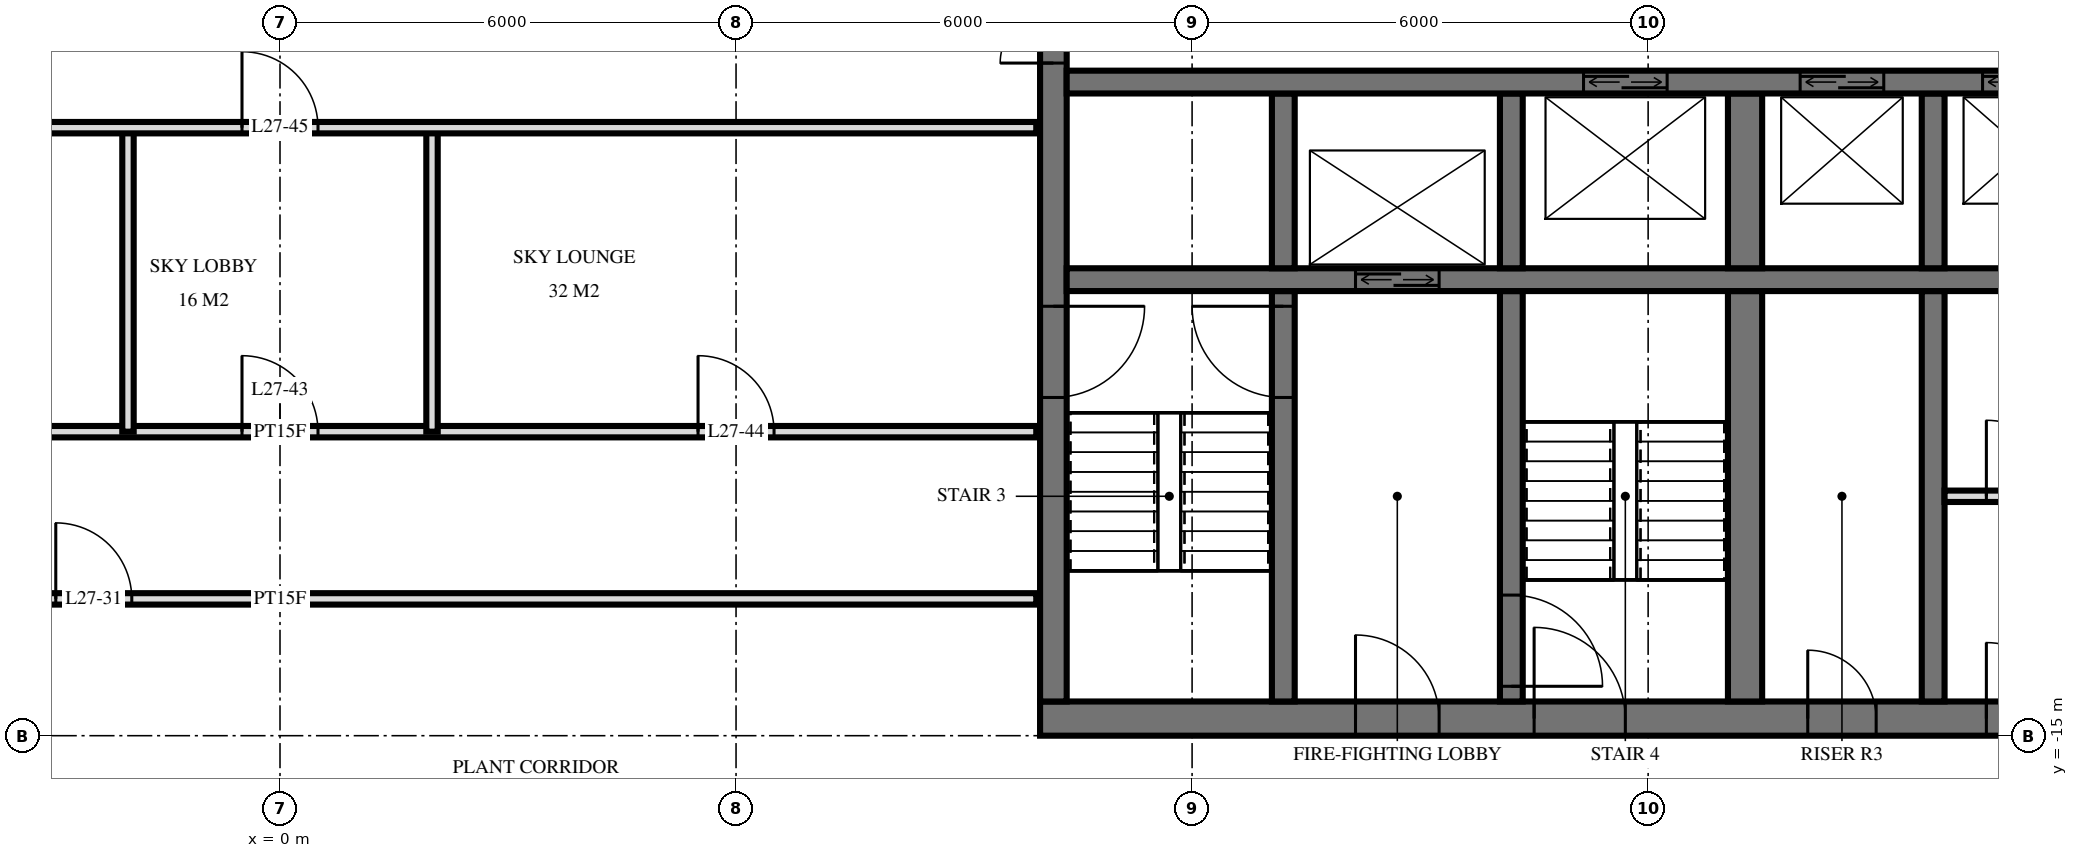
"""IFC4 building model, lengths in metres.
Left out: names, types, materials, properties, quantities, classifications, styles, units other than length and angle.
Written with IfcOpenShell. Run it as: python <this file> out.ifc"""

import sys

from ifc_helpers import new_model, si_unit, direction, frame, frame_2d, origin, place, context, subcontext, project, spatial, rectangle, extrude, element, fill, save


model = new_model("IFC4")
c1 = context("Model", 3, precision=1e-05, world=origin(), true_north=direction((0.0, 1.0)))
c2 = subcontext(c1, "Body", "Model", "MODEL_VIEW")
j1 = project(units=[si_unit("LENGTHUNIT", "METRE"), si_unit("PLANEANGLEUNIT", "RADIAN")], contexts=[c1])
p1 = place(None, origin())
s1 = spatial("IfcSite", under=j1, at=p1, CompositionType="ELEMENT")
p2 = place(p1, origin())
s2 = spatial("IfcBuilding", under=s1, at=p2, CompositionType="ELEMENT")
p3 = place(p2, frame((0.0, 0.0, 106.8)))
s3 = spatial("IfcBuildingStorey", under=s2, at=p3, CompositionType="ELEMENT", Elevation=106.8)
p4 = place(p3, frame((10.0, -14.775, 0.0), z_axis=(0.0, 0.0, 1.0), x_axis=(1.0, 0.0, 0.0)))
e1 = element("IfcWall", 1, at=p4, inside=s3, PredefinedType="SHEAR", context=c2, shape_type="SweptSolid", body=[
    extrude(rectangle(XDim=14.5, YDim=0.45, at=frame_2d((7.25, 0.0))), origin(), (0.0, 0.0, 1.0), 6.0),
])
p5 = place(p4, frame((6.5, 0.0, 0.0)))
e2 = element("IfcOpeningElement", 2, at=p5, cuts=e1, PredefinedType="OPENING", context=c2, shape_type="SweptSolid", body=[
    extrude(rectangle(XDim=1.2, YDim=2.1, at=frame_2d((0.6, 1.05))), frame((0.0, 0.235, 0.0), z_axis=(0.0, -1.0, 0.0), x_axis=(1.0, 0.0, 0.0)), (0.0, 0.0, 1.0), 0.47),
])
p6 = place(p4, frame((4.15, 0.0, 0.0)))
e3 = element("IfcOpeningElement", 3, at=p6, cuts=e1, PredefinedType="OPENING", context=c2, shape_type="SweptSolid", body=[
    extrude(rectangle(XDim=1.1, YDim=2.1, at=frame_2d((0.55, 1.05))), frame((0.0, 0.235, 0.0), z_axis=(0.0, -1.0, 0.0), x_axis=(1.0, 0.0, 0.0)), (0.0, 0.0, 1.0), 0.47),
])
p7 = place(p4, frame((10.1, 0.0, 0.0)))
e4 = element("IfcOpeningElement", 4, at=p7, cuts=e1, PredefinedType="OPENING", context=c2, shape_type="SweptSolid", body=[
    extrude(rectangle(XDim=0.9, YDim=2.1, at=frame_2d((0.45, 1.05))), frame((0.0, 0.235, 0.0), z_axis=(0.0, -1.0, 0.0), x_axis=(1.0, 0.0, 0.0)), (0.0, 0.0, 1.0), 0.47),
])
p8 = place(p4, frame((12.45, 0.0, 0.0)))
e5 = element("IfcOpeningElement", 5, at=p8, cuts=e1, PredefinedType="OPENING", context=c2, shape_type="SweptSolid", body=[
    extrude(rectangle(XDim=1.0, YDim=2.1, at=frame_2d((0.5, 1.05))), frame((0.0, 0.235, 0.0), z_axis=(0.0, -1.0, 0.0), x_axis=(1.0, 0.0, 0.0)), (0.0, 0.0, 1.0), 0.47),
])
p9 = place(p3, frame((10.175, -14.55, 0.0), z_axis=(0.0, 0.0, 1.0), x_axis=(0.0, 1.0, 0.0)))
e6 = element("IfcWall", 6, at=p9, inside=s3, PredefinedType="SHEAR", context=c2, shape_type="SweptSolid", body=[
    extrude(rectangle(XDim=14.1, YDim=0.35, at=frame_2d((7.05, 0.0))), origin(), (0.0, 0.0, 1.0), 6.0),
])
p10 = place(p9, frame((8.4, 0.0, 0.0)))
e7 = element("IfcOpeningElement", 7, at=p10, cuts=e6, PredefinedType="OPENING", context=c2, shape_type="SweptSolid", body=[
    extrude(rectangle(XDim=1.4, YDim=2.4, at=frame_2d((0.7, 1.2))), frame((0.0, 0.185, 0.0), z_axis=(0.0, -1.0, 0.0), x_axis=(1.0, 0.0, 0.0)), (0.0, 0.0, 1.0), 0.37),
])
p11 = place(p9, frame((10.0, 0.0, 0.0)))
e8 = element("IfcOpeningElement", 8, at=p11, cuts=e6, PredefinedType="OPENING", context=c2, shape_type="SweptSolid", body=[
    extrude(rectangle(XDim=1.4, YDim=2.4, at=frame_2d((0.7, 1.2))), frame((0.0, 0.185, 0.0), z_axis=(0.0, -1.0, 0.0), x_axis=(1.0, 0.0, 0.0)), (0.0, 0.0, 1.0), 0.37),
])
p12 = place(p9, frame((4.0, 0.0, 0.0)))
e9 = element("IfcOpeningElement", 9, at=p12, cuts=e6, PredefinedType="OPENING", context=c2, shape_type="SweptSolid", body=[
    extrude(rectangle(XDim=1.2, YDim=2.1, at=frame_2d((0.6, 1.05))), frame((0.0, 0.185, 0.0), z_axis=(0.0, -1.0, 0.0), x_axis=(1.0, 0.0, 0.0)), (0.0, 0.0, 1.0), 0.37),
])
p13 = place(p3, frame((10.35, -6.4, 0.0), z_axis=(0.0, 0.0, 1.0), x_axis=(1.0, 0.0, 0.0)))
e10 = element("IfcWall", 10, at=p13, inside=s3, PredefinedType="SHEAR", context=c2, shape_type="SweptSolid", body=[
    extrude(rectangle(XDim=13.7, YDim=0.3, at=frame_2d((6.85, 0.0))), origin(), (0.0, 0.0, 1.0), 6.0),
])
p14 = place(p13, frame((9.65, 0.0, 0.0)))
e11 = element("IfcOpeningElement", 11, at=p14, cuts=e10, PredefinedType="OPENING", context=c2, shape_type="SweptSolid", body=[
    extrude(rectangle(XDim=1.1, YDim=2.1, at=frame_2d((0.55, 1.05))), frame((0.0, 0.16, 0.0), z_axis=(0.0, -1.0, 0.0), x_axis=(1.0, 0.0, 0.0)), (0.0, 0.0, 1.0), 0.32),
])
p15 = place(p13, frame((12.05, 0.0, 0.0)))
e12 = element("IfcOpeningElement", 12, at=p15, cuts=e10, PredefinedType="OPENING", context=c2, shape_type="SweptSolid", body=[
    extrude(rectangle(XDim=1.1, YDim=2.1, at=frame_2d((0.55, 1.05))), frame((0.0, 0.16, 0.0), z_axis=(0.0, -1.0, 0.0), x_axis=(1.0, 0.0, 0.0)), (0.0, 0.0, 1.0), 0.32),
])
p16 = place(p13, frame((6.8, 0.0, 0.0)))
e13 = element("IfcOpeningElement", 13, at=p16, cuts=e10, PredefinedType="OPENING", context=c2, shape_type="SweptSolid", body=[
    extrude(rectangle(XDim=1.1, YDim=2.1, at=frame_2d((0.55, 1.05))), frame((0.0, 0.16, 0.0), z_axis=(0.0, -1.0, 0.0), x_axis=(1.0, 0.0, 0.0)), (0.0, 0.0, 1.0), 0.32),
])
p17 = place(p3, frame((10.35, -9.0, 0.0), z_axis=(0.0, 0.0, 1.0), x_axis=(1.0, 0.0, 0.0)))
e14 = element("IfcWall", 14, at=p17, inside=s3, PredefinedType="SHEAR", context=c2, shape_type="SweptSolid", body=[
    extrude(rectangle(XDim=13.7, YDim=0.3, at=frame_2d((6.85, 0.0))), origin(), (0.0, 0.0, 1.0), 6.0),
])
p18 = place(p17, frame((3.8, 0.0, 0.0)))
e15 = element("IfcOpeningElement", 15, at=p18, cuts=e14, PredefinedType="OPENING", context=c2, shape_type="SweptSolid", body=[
    extrude(rectangle(XDim=1.1, YDim=2.1, at=frame_2d((0.55, 1.05))), frame((0.0, 0.16, 0.0), z_axis=(0.0, -1.0, 0.0), x_axis=(1.0, 0.0, 0.0)), (0.0, 0.0, 1.0), 0.32),
])
p19 = place(p3, frame((13.2, -8.85, 0.0), z_axis=(0.0, 0.0, 1.0), x_axis=(0.0, 1.0, 0.0)))
e16 = element("IfcWall", 16, at=p19, inside=s3, PredefinedType="SHEAR", context=c2, shape_type="SweptSolid", body=[
    extrude(rectangle(XDim=2.3, YDim=0.3, at=frame_2d((1.15, 0.0))), origin(), (0.0, 0.0, 1.0), 6.0),
])
p20 = place(p3, frame((13.2, -14.55, 0.0), z_axis=(0.0, 0.0, 1.0), x_axis=(0.0, 1.0, 0.0)))
e17 = element("IfcWall", 17, at=p20, inside=s3, PredefinedType="SHEAR", context=c2, shape_type="SweptSolid", body=[
    extrude(rectangle(XDim=5.4, YDim=0.3, at=frame_2d((2.7, 0.0))), origin(), (0.0, 0.0, 1.0), 6.0),
])
p21 = place(p20, frame((4.0, 0.0, 0.0)))
e18 = element("IfcOpeningElement", 18, at=p21, cuts=e17, PredefinedType="OPENING", context=c2, shape_type="SweptSolid", body=[
    extrude(rectangle(XDim=1.2, YDim=2.1, at=frame_2d((0.6, 1.05))), frame((0.0, 0.16, 0.0), z_axis=(0.0, -1.0, 0.0), x_axis=(1.0, 0.0, 0.0)), (0.0, 0.0, 1.0), 0.32),
])
p22 = place(p3, frame((16.2, -8.85, 0.0), z_axis=(0.0, 0.0, 1.0), x_axis=(0.0, 1.0, 0.0)))
e19 = element("IfcWall", 19, at=p22, inside=s3, PredefinedType="SHEAR", context=c2, shape_type="SweptSolid", body=[
    extrude(rectangle(XDim=2.3, YDim=0.3, at=frame_2d((1.15, 0.0))), origin(), (0.0, 0.0, 1.0), 6.0),
])
p23 = place(p3, frame((16.2, -14.55, 0.0), z_axis=(0.0, 0.0, 1.0), x_axis=(0.0, 1.0, 0.0)))
e20 = element("IfcWall", 20, at=p23, inside=s3, PredefinedType="SHEAR", context=c2, shape_type="SweptSolid", body=[
    extrude(rectangle(XDim=5.4, YDim=0.3, at=frame_2d((2.7, 0.0))), origin(), (0.0, 0.0, 1.0), 6.0),
])
p24 = place(p23, frame((0.2, 0.0, 0.0)))
e21 = element("IfcOpeningElement", 21, at=p24, cuts=e20, PredefinedType="OPENING", context=c2, shape_type="SweptSolid", body=[
    extrude(rectangle(XDim=1.2, YDim=2.1, at=frame_2d((0.6, 1.05))), frame((0.0, 0.16, 0.0), z_axis=(0.0, -1.0, 0.0), x_axis=(1.0, 0.0, 0.0)), (0.0, 0.0, 1.0), 0.32),
])
p25 = place(p3, frame((19.275, -8.85, 0.0), z_axis=(0.0, 0.0, 1.0), x_axis=(0.0, 1.0, 0.0)))
e22 = element("IfcWall", 22, at=p25, inside=s3, PredefinedType="SHEAR", context=c2, shape_type="SweptSolid", body=[
    extrude(rectangle(XDim=2.3, YDim=0.45, at=frame_2d((1.15, 0.0))), origin(), (0.0, 0.0, 1.0), 6.0),
])
p26 = place(p3, frame((19.275, -14.55, 0.0), z_axis=(0.0, 0.0, 1.0), x_axis=(0.0, 1.0, 0.0)))
e23 = element("IfcWall", 23, at=p26, inside=s3, PredefinedType="SHEAR", context=c2, shape_type="SweptSolid", body=[
    extrude(rectangle(XDim=5.4, YDim=0.45, at=frame_2d((2.7, 0.0))), origin(), (0.0, 0.0, 1.0), 6.0),
])
p27 = place(p3, frame((21.75, -8.85, 0.0), z_axis=(0.0, 0.0, 1.0), x_axis=(0.0, 1.0, 0.0)))
e24 = element("IfcWall", 24, at=p27, inside=s3, PredefinedType="SHEAR", context=c2, shape_type="SweptSolid", body=[
    extrude(rectangle(XDim=2.3, YDim=0.3, at=frame_2d((1.15, 0.0))), origin(), (0.0, 0.0, 1.0), 6.0),
])
p28 = place(p3, frame((21.75, -14.55, 0.0), z_axis=(0.0, 0.0, 1.0), x_axis=(0.0, 1.0, 0.0)))
e25 = element("IfcWall", 25, at=p28, inside=s3, PredefinedType="SHEAR", context=c2, shape_type="SweptSolid", body=[
    extrude(rectangle(XDim=5.4, YDim=0.3, at=frame_2d((2.7, 0.0))), origin(), (0.0, 0.0, 1.0), 6.0),
])
p29 = place(p3, frame((21.9, -11.85, 0.0), z_axis=(0.0, 0.0, 1.0), x_axis=(1.0, 0.0, 0.0)))
e26 = element("IfcWall", 26, at=p29, inside=s3, PredefinedType="PARTITIONING", context=c2, shape_type="SweptSolid", body=[
    extrude(rectangle(XDim=2.1, YDim=0.15, at=frame_2d((1.05, 0.0))), origin(), (0.0, 0.0, 1.0), 5.7),
])
p30 = place(p29, frame((0.55, 0.0, 0.0)))
e27 = element("IfcOpeningElement", 27, at=p30, cuts=e26, PredefinedType="OPENING", context=c2, shape_type="SweptSolid", body=[
    extrude(rectangle(XDim=1.0, YDim=2.1, at=frame_2d((0.5, 1.05))), frame((0.0, 0.085, 0.0), z_axis=(0.0, -1.0, 0.0), x_axis=(1.0, 0.0, 0.0)), (0.0, 0.0, 1.0), 0.17),
])
for number, where, z_axis, x_axis in (
    (28, (2.0, -11.0, 0.0), (0.0, 0.0, 1.0), (0.0, 1.0, 0.0)),
    (29, (-2.0, -11.0, 0.0), (0.0, 0.0, 1.0), (0.0, 1.0, 0.0)),
):
    element("IfcWall", number, at=place(p3, frame(where, z_axis=z_axis, x_axis=x_axis)), inside=s3, PredefinedType="PARTITIONING", context=c2, shape_type="SweptSolid", body=[
        extrude(rectangle(XDim=4.0, YDim=0.15, at=frame_2d((2.0, 0.0))), origin(), (0.0, 0.0, 1.0), 5.7),
    ])
p31 = place(p3, frame((-9.95, -13.2, 0.0), z_axis=(0.0, 0.0, 1.0), x_axis=(1.0, 0.0, 0.0)))
e30 = element("IfcWall", 30, at=p31, inside=s3, PredefinedType="PARTITIONING", context=c2, shape_type="SweptSolid", body=[
    extrude(rectangle(XDim=19.9, YDim=0.15, at=frame_2d((9.95, 0.0))), origin(), (0.0, 0.0, 1.0), 5.7),
])
p32 = place(p31, frame((7.0, 0.0, 0.0)))
e31 = element("IfcOpeningElement", 31, at=p32, cuts=e30, PredefinedType="OPENING", context=c2, shape_type="SweptSolid", body=[
    extrude(rectangle(XDim=1.0, YDim=2.1, at=frame_2d((0.5, 1.05))), frame((0.0, 0.085, 0.0), z_axis=(0.0, -1.0, 0.0), x_axis=(1.0, 0.0, 0.0)), (0.0, 0.0, 1.0), 0.17),
])
p33 = place(p3, frame((-9.95, -11.0, 0.0), z_axis=(0.0, 0.0, 1.0), x_axis=(1.0, 0.0, 0.0)))
e32 = element("IfcWall", 32, at=p33, inside=s3, PredefinedType="PARTITIONING", context=c2, shape_type="SweptSolid", body=[
    extrude(rectangle(XDim=19.9, YDim=0.15, at=frame_2d((9.95, 0.0))), origin(), (0.0, 0.0, 1.0), 5.7),
])
p34 = place(p33, frame((9.45, 0.0, 0.0)))
e33 = element("IfcOpeningElement", 33, at=p34, cuts=e32, PredefinedType="OPENING", context=c2, shape_type="SweptSolid", body=[
    extrude(rectangle(XDim=1.0, YDim=2.1, at=frame_2d((0.5, 1.05))), frame((0.0, 0.085, 0.0), z_axis=(0.0, -1.0, 0.0), x_axis=(1.0, 0.0, 0.0)), (0.0, 0.0, 1.0), 0.17),
])
p35 = place(p33, frame((15.45, 0.0, 0.0)))
e34 = element("IfcOpeningElement", 34, at=p35, cuts=e32, PredefinedType="OPENING", context=c2, shape_type="SweptSolid", body=[
    extrude(rectangle(XDim=1.0, YDim=2.1, at=frame_2d((0.5, 1.05))), frame((0.0, 0.085, 0.0), z_axis=(0.0, -1.0, 0.0), x_axis=(1.0, 0.0, 0.0)), (0.0, 0.0, 1.0), 0.17),
])
p36 = place(p3, frame((-9.95, -7.0, 0.0), z_axis=(0.0, 0.0, 1.0), x_axis=(1.0, 0.0, 0.0)))
e35 = element("IfcWall", 35, at=p36, inside=s3, PredefinedType="PARTITIONING", context=c2, shape_type="SweptSolid", body=[
    extrude(rectangle(XDim=19.9, YDim=0.15, at=frame_2d((9.95, 0.0))), origin(), (0.0, 0.0, 1.0), 5.7),
])
p37 = place(p36, frame((9.45, 0.0, 0.0)))
e36 = element("IfcOpeningElement", 36, at=p37, cuts=e35, PredefinedType="OPENING", context=c2, shape_type="SweptSolid", body=[
    extrude(rectangle(XDim=1.0, YDim=2.1, at=frame_2d((0.5, 1.05))), frame((0.0, 0.085, 0.0), z_axis=(0.0, -1.0, 0.0), x_axis=(1.0, 0.0, 0.0)), (0.0, 0.0, 1.0), 0.17),
])
p38 = place(p36, frame((2.0, 0.0, 0.0)))
e37 = element("IfcOpeningElement", 37, at=p38, cuts=e35, PredefinedType="OPENING", context=c2, shape_type="SweptSolid", body=[
    extrude(rectangle(XDim=1.0, YDim=2.1, at=frame_2d((0.5, 1.05))), frame((0.0, 0.085, 0.0), z_axis=(0.0, -1.0, 0.0), x_axis=(1.0, 0.0, 0.0)), (0.0, 0.0, 1.0), 0.17),
])
p39 = place(p14, origin())
e38 = element("IfcDoor", 38, at=p39, inside=s3, OperationType="DOUBLE_DOOR_SLIDING", PredefinedType="USERDEFINED", context=c2, shape_type="SweptSolid", body=[
    extrude(rectangle(XDim=1.1, YDim=2.1, at=frame_2d((0.55, 1.05))), frame((0.0, 0.025, 0.0), z_axis=(0.0, -1.0, 0.0), x_axis=(1.0, 0.0, 0.0)), (0.0, 0.0, 1.0), 0.05),
])
fill(e11, e38)
p40 = place(p15, origin())
e39 = element("IfcDoor", 39, at=p40, inside=s3, OperationType="DOUBLE_DOOR_SLIDING", PredefinedType="USERDEFINED", context=c2, shape_type="SweptSolid", body=[
    extrude(rectangle(XDim=1.1, YDim=2.1, at=frame_2d((0.55, 1.05))), frame((0.0, 0.025, 0.0), z_axis=(0.0, -1.0, 0.0), x_axis=(1.0, 0.0, 0.0)), (0.0, 0.0, 1.0), 0.05),
])
fill(e12, e39)
p41 = place(p18, origin())
e40 = element("IfcDoor", 40, at=p41, inside=s3, OperationType="DOUBLE_DOOR_SLIDING", PredefinedType="USERDEFINED", context=c2, shape_type="SweptSolid", body=[
    extrude(rectangle(XDim=1.1, YDim=2.1, at=frame_2d((0.55, 1.05))), frame((0.0, 0.025, 0.0), z_axis=(0.0, -1.0, 0.0), x_axis=(1.0, 0.0, 0.0)), (0.0, 0.0, 1.0), 0.05),
])
fill(e15, e40)
p42 = place(p16, origin())
e41 = element("IfcDoor", 41, at=p42, inside=s3, OperationType="DOUBLE_DOOR_SLIDING", PredefinedType="USERDEFINED", context=c2, shape_type="SweptSolid", body=[
    extrude(rectangle(XDim=1.1, YDim=2.1, at=frame_2d((0.55, 1.05))), frame((0.0, 0.025, 0.0), z_axis=(0.0, -1.0, 0.0), x_axis=(1.0, 0.0, 0.0)), (0.0, 0.0, 1.0), 0.05),
])
fill(e13, e41)
p43 = place(p10, origin())
e42 = element("IfcDoor", 42, at=p43, inside=s3, OperationType="DOUBLE_DOOR_SINGLE_SWING", PredefinedType="DOOR", context=c2, shape_type="SweptSolid", body=[
    extrude(rectangle(XDim=1.4, YDim=2.4, at=frame_2d((0.7, 1.2))), frame((0.0, 0.025, 0.0), z_axis=(0.0, -1.0, 0.0), x_axis=(1.0, 0.0, 0.0)), (0.0, 0.0, 1.0), 0.05),
])
fill(e7, e42)
p44 = place(p12, frame((0.6, 0.0, 0.0), z_axis=(0.0, 0.0, 1.0), x_axis=(-1.0, 0.0, 0.0)))
e43 = element("IfcDoor", 43, at=p44, inside=s3, OperationType="SINGLE_SWING_RIGHT", PredefinedType="DOOR", context=c2, shape_type="SweptSolid", body=[
    extrude(rectangle(XDim=1.2, YDim=2.1, at=frame_2d((0.0, 1.05))), frame((0.0, -0.025, 0.0), z_axis=(0.0, 1.0, 0.0), x_axis=(-1.0, 0.0, 0.0)), (0.0, 0.0, 1.0), 0.05),
])
fill(e9, e43)
p45 = place(p5, origin())
e44 = element("IfcDoor", 44, at=p45, inside=s3, OperationType="SINGLE_SWING_RIGHT", PredefinedType="DOOR", context=c2, shape_type="SweptSolid", body=[
    extrude(rectangle(XDim=1.2, YDim=2.1, at=frame_2d((0.6, 1.05))), frame((0.0, 0.025, 0.0), z_axis=(0.0, -1.0, 0.0), x_axis=(1.0, 0.0, 0.0)), (0.0, 0.0, 1.0), 0.05),
])
fill(e2, e44)
p46 = place(p6, origin())
e45 = element("IfcDoor", 45, at=p46, inside=s3, OperationType="SINGLE_SWING_RIGHT", PredefinedType="DOOR", context=c2, shape_type="SweptSolid", body=[
    extrude(rectangle(XDim=1.1, YDim=2.1, at=frame_2d((0.55, 1.05))), frame((0.0, 0.025, 0.0), z_axis=(0.0, -1.0, 0.0), x_axis=(1.0, 0.0, 0.0)), (0.0, 0.0, 1.0), 0.05),
])
fill(e3, e45)
p47 = place(p7, origin())
e46 = element("IfcDoor", 46, at=p47, inside=s3, OperationType="SINGLE_SWING_RIGHT", PredefinedType="DOOR", context=c2, shape_type="SweptSolid", body=[
    extrude(rectangle(XDim=0.9, YDim=2.1, at=frame_2d((0.45, 1.05))), frame((0.0, 0.025, 0.0), z_axis=(0.0, -1.0, 0.0), x_axis=(1.0, 0.0, 0.0)), (0.0, 0.0, 1.0), 0.05),
])
fill(e4, e46)
p48 = place(p8, origin())
e47 = element("IfcDoor", 47, at=p48, inside=s3, OperationType="SINGLE_SWING_RIGHT", PredefinedType="DOOR", context=c2, shape_type="SweptSolid", body=[
    extrude(rectangle(XDim=1.0, YDim=2.1, at=frame_2d((0.5, 1.05))), frame((0.0, 0.025, 0.0), z_axis=(0.0, -1.0, 0.0), x_axis=(1.0, 0.0, 0.0)), (0.0, 0.0, 1.0), 0.05),
])
fill(e5, e47)
p49 = place(p21, origin())
e48 = element("IfcDoor", 48, at=p49, inside=s3, OperationType="SINGLE_SWING_LEFT", PredefinedType="DOOR", context=c2, shape_type="SweptSolid", body=[
    extrude(rectangle(XDim=1.2, YDim=2.1, at=frame_2d((0.6, 1.05))), frame((0.0, 0.025, 0.0), z_axis=(0.0, -1.0, 0.0), x_axis=(1.0, 0.0, 0.0)), (0.0, 0.0, 1.0), 0.05),
])
fill(e18, e48)
p50 = place(p24, frame((0.6, 0.0, 0.0), z_axis=(0.0, 0.0, 1.0), x_axis=(-1.0, 0.0, 0.0)))
e49 = element("IfcDoor", 49, at=p50, inside=s3, OperationType="SINGLE_SWING_LEFT", PredefinedType="DOOR", context=c2, shape_type="SweptSolid", body=[
    extrude(rectangle(XDim=1.2, YDim=2.1, at=frame_2d((0.0, 1.05))), frame((0.0, -0.025, 0.0), z_axis=(0.0, 1.0, 0.0), x_axis=(-1.0, 0.0, 0.0)), (0.0, 0.0, 1.0), 0.05),
])
fill(e21, e49)
p51 = place(p30, origin())
e50 = element("IfcDoor", 50, at=p51, inside=s3, OperationType="SINGLE_SWING_RIGHT", PredefinedType="DOOR", context=c2, shape_type="SweptSolid", body=[
    extrude(rectangle(XDim=1.0, YDim=2.1, at=frame_2d((0.5, 1.05))), frame((0.0, 0.025, 0.0), z_axis=(0.0, -1.0, 0.0), x_axis=(1.0, 0.0, 0.0)), (0.0, 0.0, 1.0), 0.05),
])
fill(e27, e50)
p52 = place(p32, origin())
e51 = element("IfcDoor", 51, at=p52, inside=s3, OperationType="SINGLE_SWING_RIGHT", PredefinedType="DOOR", context=c2, shape_type="SweptSolid", body=[
    extrude(rectangle(XDim=1.0, YDim=2.1, at=frame_2d((0.5, 1.05))), frame((0.0, 0.025, 0.0), z_axis=(0.0, -1.0, 0.0), x_axis=(1.0, 0.0, 0.0)), (0.0, 0.0, 1.0), 0.05),
])
fill(e31, e51)
p53 = place(p34, origin())
e52 = element("IfcDoor", 52, at=p53, inside=s3, OperationType="SINGLE_SWING_RIGHT", PredefinedType="DOOR", context=c2, shape_type="SweptSolid", body=[
    extrude(rectangle(XDim=1.0, YDim=2.1, at=frame_2d((0.5, 1.05))), frame((0.0, 0.025, 0.0), z_axis=(0.0, -1.0, 0.0), x_axis=(1.0, 0.0, 0.0)), (0.0, 0.0, 1.0), 0.05),
])
fill(e33, e52)
p54 = place(p35, origin())
e53 = element("IfcDoor", 53, at=p54, inside=s3, OperationType="SINGLE_SWING_RIGHT", PredefinedType="DOOR", context=c2, shape_type="SweptSolid", body=[
    extrude(rectangle(XDim=1.0, YDim=2.1, at=frame_2d((0.5, 1.05))), frame((0.0, 0.025, 0.0), z_axis=(0.0, -1.0, 0.0), x_axis=(1.0, 0.0, 0.0)), (0.0, 0.0, 1.0), 0.05),
])
fill(e34, e53)
p55 = place(p37, origin())
e54 = element("IfcDoor", 54, at=p55, inside=s3, OperationType="SINGLE_SWING_RIGHT", PredefinedType="DOOR", context=c2, shape_type="SweptSolid", body=[
    extrude(rectangle(XDim=1.0, YDim=2.1, at=frame_2d((0.5, 1.05))), frame((0.0, 0.025, 0.0), z_axis=(0.0, -1.0, 0.0), x_axis=(1.0, 0.0, 0.0)), (0.0, 0.0, 1.0), 0.05),
])
fill(e36, e54)
save(model, sys.argv[1])
